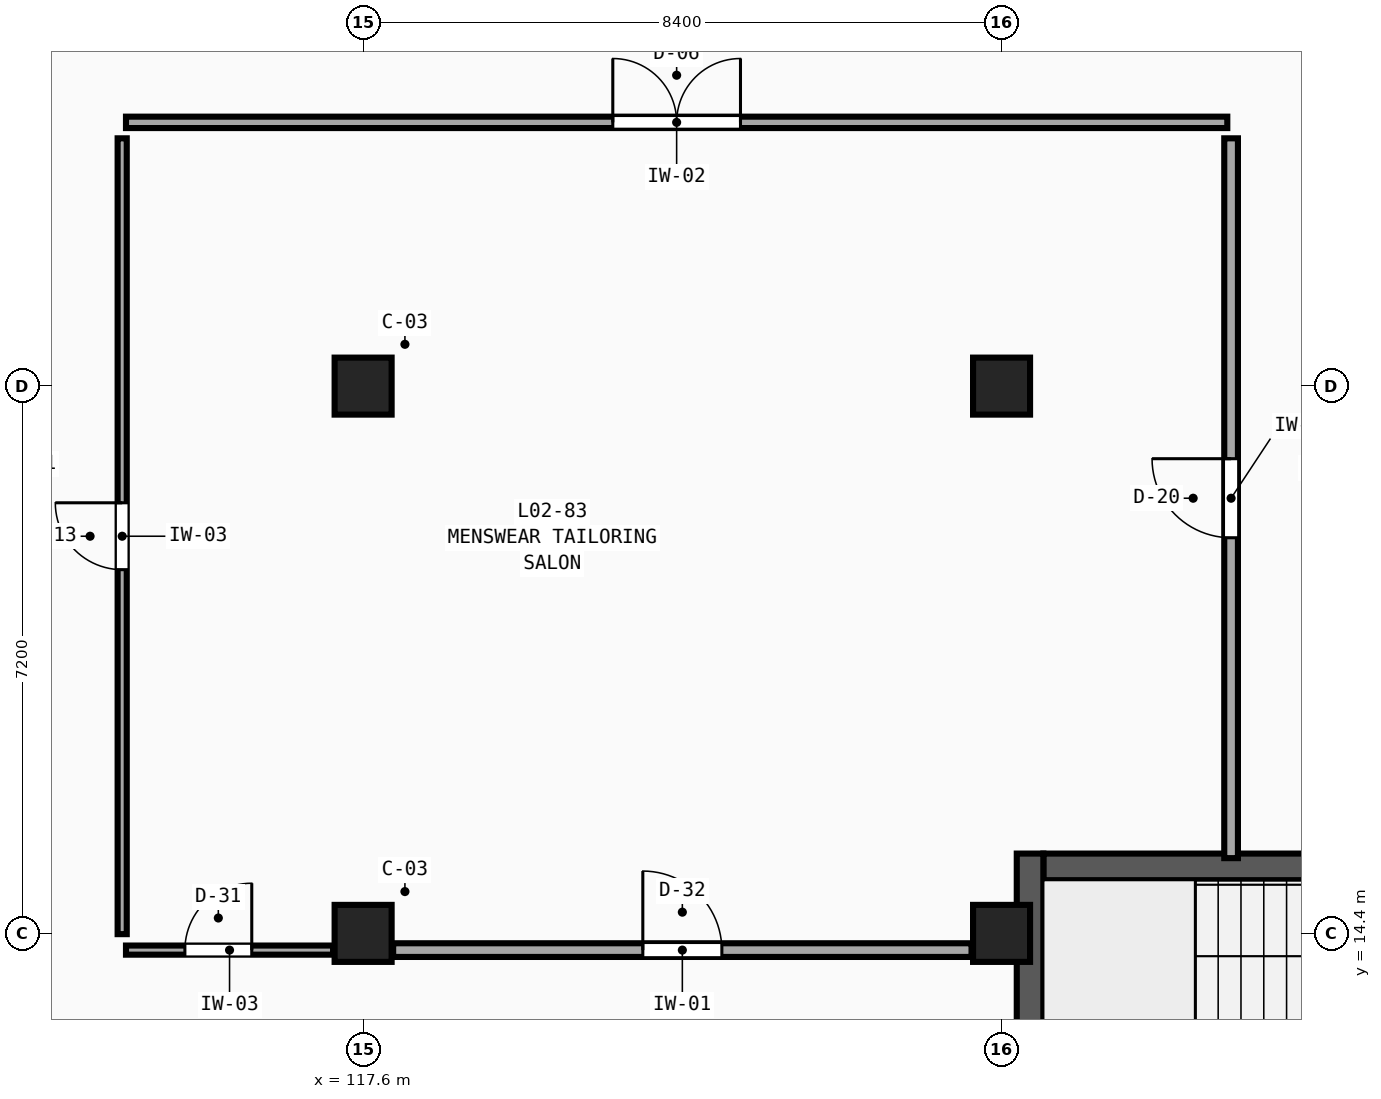
"""IFC4 building model, lengths in metres.
Left out: names, types, materials, properties, quantities, classifications, styles, units other than length and angle.
Written with IfcOpenShell. Run it as: python <this file> out.ifc"""

import sys

from ifc_helpers import new_model, si_unit, direction, frame, frame_2d, origin, origin_2d, place, context, subcontext, project, spatial, rectangle, extrude, element, fill, save


model = new_model("IFC4")
c1 = context("Model", 3, precision=1e-05, world=origin(), true_north=direction((0.0, 1.0)))
c2 = subcontext(c1, "Body", "Model", "MODEL_VIEW")
j1 = project(units=[si_unit("LENGTHUNIT", "METRE"), si_unit("PLANEANGLEUNIT", "RADIAN")], contexts=[c1])
p1 = place(None, origin())
s1 = spatial("IfcSite", under=j1, at=p1, CompositionType="ELEMENT")
p2 = place(p1, origin())
s2 = spatial("IfcBuilding", under=s1, at=p2, CompositionType="ELEMENT")
p3 = place(p2, frame((0.0, 0.0, 9.9)))
s3 = spatial("IfcBuildingStorey", under=s2, at=p3, CompositionType="ELEMENT", Elevation=9.9)
for number, where, z_axis, x_axis in (
    (1, (117.6, 14.4, 0.0), (0.0, 0.0, 1.0), (1.0, 0.0, 0.0)),
    (2, (117.6, 21.6, 0.0), (0.0, 0.0, 1.0), (1.0, 0.0, 0.0)),
    (3, (126.0, 14.4, 0.0), (0.0, 0.0, 1.0), (1.0, 0.0, 0.0)),
    (4, (126.0, 21.6, 0.0), (0.0, 0.0, 1.0), (1.0, 0.0, 0.0)),
):
    element("IfcColumn", number, at=place(p3, frame(where, z_axis=z_axis, x_axis=x_axis)), inside=s3, PredefinedType="COLUMN", context=c2, shape_type="SweptSolid", body=[
        extrude(rectangle(XDim=0.75, YDim=0.75, at=origin_2d()), origin(), (0.0, 0.0, 1.0), 4.5),
    ])
p4 = place(p3, frame((126.55, 15.275, 0.0), z_axis=(0.0, 0.0, 1.0), x_axis=(1.0, 0.0, 0.0)))
e5 = element("IfcWall", 5, at=p4, inside=s3, PredefinedType="SHEAR", context=c2, shape_type="SweptSolid", body=[
    extrude(rectangle(XDim=7.3, YDim=0.35, at=frame_2d((3.65, 0.0))), origin(), (0.0, 0.0, 1.0), 4.5),
])
p5 = place(p3, frame((126.375, 15.45, 0.0), z_axis=(0.0, 0.0, 1.0), x_axis=(0.0, -1.0, 0.0)))
e6 = element("IfcWall", 6, at=p5, inside=s3, PredefinedType="SHEAR", context=c2, shape_type="SweptSolid", body=[
    extrude(rectangle(XDim=8.15, YDim=0.35, at=frame_2d((4.075, 0.0))), origin(), (0.0, 0.0, 1.0), 4.5),
])
p6 = place(p3, frame((114.48, 25.07, 0.0), z_axis=(0.0, 0.0, 1.0), x_axis=(1.0, 0.0, 0.0)))
e7 = element("IfcWall", 7, at=p6, inside=s3, PredefinedType="PARTITIONING", context=c2, shape_type="SweptSolid", body=[
    extrude(rectangle(XDim=14.49, YDim=0.15, at=frame_2d((7.245, 0.0))), origin(), (0.0, 0.0, 1.0), 4.18),
])
p7 = place(p6, frame((6.405, 0.0, 0.0)))
e8 = element("IfcOpeningElement", 8, at=p7, cuts=e7, PredefinedType="OPENING", context=c2, shape_type="SweptSolid", body=[
    extrude(rectangle(XDim=1.68, YDim=2.05, at=frame_2d((0.84, 1.025))), frame((0.0, 0.095, 0.0), z_axis=(0.0, -1.0, 0.0), x_axis=(1.0, 0.0, 0.0)), (0.0, 0.0, 1.0), 0.19),
])
p8 = place(p3, frame((114.48, 14.18, 0.0), z_axis=(0.0, 0.0, 1.0), x_axis=(1.0, 0.0, 0.0)))
e9 = element("IfcWall", 9, at=p8, inside=s3, PredefinedType="PARTITIONING", context=c2, shape_type="SweptSolid", body=[
    extrude(rectangle(XDim=2.725, YDim=0.12, at=frame_2d((1.363, 0.0))), origin(), (0.0, 0.0, 1.0), 3.73),
])
p9 = place(p8, frame((0.775, 0.0, 0.0)))
e10 = element("IfcOpeningElement", 10, at=p9, cuts=e9, PredefinedType="OPENING", context=c2, shape_type="SweptSolid", body=[
    extrude(rectangle(XDim=0.88, YDim=2.45, at=frame_2d((0.44, 1.225))), frame((0.0, 0.08, 0.0), z_axis=(0.0, -1.0, 0.0), x_axis=(1.0, 0.0, 0.0)), (0.0, 0.0, 1.0), 0.16),
])
p10 = place(p3, frame((117.995, 14.18, 0.0), z_axis=(0.0, 0.0, 1.0), x_axis=(1.0, 0.0, 0.0)))
e11 = element("IfcWall", 11, at=p10, inside=s3, PredefinedType="PARTITIONING", context=c2, shape_type="SweptSolid", body=[
    extrude(rectangle(XDim=7.61, YDim=0.18, at=frame_2d((3.805, 0.0))), origin(), (0.0, 0.0, 1.0), 3.73),
])
p11 = place(p10, frame((3.285, 0.0, 0.0)))
e12 = element("IfcOpeningElement", 12, at=p11, cuts=e11, PredefinedType="OPENING", context=c2, shape_type="SweptSolid", body=[
    extrude(rectangle(XDim=1.04, YDim=2.45, at=frame_2d((0.52, 1.225))), frame((0.0, 0.11, 0.0), z_axis=(0.0, -1.0, 0.0), x_axis=(1.0, 0.0, 0.0)), (0.0, 0.0, 1.0), 0.22),
])
p12 = place(p3, frame((114.43, 14.39, 0.0), z_axis=(0.0, 0.0, 1.0), x_axis=(0.0, 1.0, 0.0)))
e13 = element("IfcWall", 13, at=p12, inside=s3, PredefinedType="PARTITIONING", context=c2, shape_type="SweptSolid", body=[
    extrude(rectangle(XDim=10.47, YDim=0.12, at=frame_2d((5.235, 0.0))), origin(), (0.0, 0.0, 1.0), 4.18),
])
p13 = place(p12, frame((4.795, 0.0, 0.0)))
e14 = element("IfcOpeningElement", 14, at=p13, cuts=e13, PredefinedType="OPENING", context=c2, shape_type="SweptSolid", body=[
    extrude(rectangle(XDim=0.88, YDim=2.21, at=frame_2d((0.44, 1.105))), frame((0.0, 0.08, 0.0), z_axis=(0.0, -1.0, 0.0), x_axis=(1.0, 0.0, 0.0)), (0.0, 0.0, 1.0), 0.16),
])
p14 = place(p3, frame((129.02, 15.39, 0.0), z_axis=(0.0, 0.0, 1.0), x_axis=(0.0, 1.0, 0.0)))
e15 = element("IfcWall", 15, at=p14, inside=s3, PredefinedType="PARTITIONING", context=c2, shape_type="SweptSolid", body=[
    extrude(rectangle(XDim=9.47, YDim=0.18, at=frame_2d((4.735, 0.0))), origin(), (0.0, 0.0, 1.0), 4.18),
])
p15 = place(p14, frame((4.215, 0.0, 0.0)))
e16 = element("IfcOpeningElement", 16, at=p15, cuts=e15, PredefinedType="OPENING", context=c2, shape_type="SweptSolid", body=[
    extrude(rectangle(XDim=1.04, YDim=2.29, at=frame_2d((0.52, 1.145))), frame((0.0, 0.11, 0.0), z_axis=(0.0, -1.0, 0.0), x_axis=(1.0, 0.0, 0.0)), (0.0, 0.0, 1.0), 0.22),
])
p16 = place(p7, origin())
e17 = element("IfcDoor", 17, at=p16, inside=s3, OperationType="DOUBLE_DOOR_SINGLE_SWING", PredefinedType="DOOR", context=c2, shape_type="SweptSolid", body=[
    extrude(rectangle(XDim=1.68, YDim=2.05, at=frame_2d((0.84, 1.025))), frame((0.0, 0.025, 0.0), z_axis=(0.0, -1.0, 0.0), x_axis=(1.0, 0.0, 0.0)), (0.0, 0.0, 1.0), 0.05),
])
fill(e8, e17)
p17 = place(p9, origin())
e18 = element("IfcDoor", 18, at=p17, inside=s3, OperationType="SINGLE_SWING_RIGHT", PredefinedType="DOOR", context=c2, shape_type="SweptSolid", body=[
    extrude(rectangle(XDim=0.88, YDim=2.45, at=frame_2d((0.44, 1.225))), frame((0.0, 0.025, 0.0), z_axis=(0.0, -1.0, 0.0), x_axis=(1.0, 0.0, 0.0)), (0.0, 0.0, 1.0), 0.05),
])
fill(e10, e18)
p18 = place(p11, origin())
e19 = element("IfcDoor", 19, at=p18, inside=s3, OperationType="SINGLE_SWING_LEFT", PredefinedType="DOOR", context=c2, shape_type="SweptSolid", body=[
    extrude(rectangle(XDim=1.04, YDim=2.45, at=frame_2d((0.52, 1.225))), frame((0.0, 0.025, 0.0), z_axis=(0.0, -1.0, 0.0), x_axis=(1.0, 0.0, 0.0)), (0.0, 0.0, 1.0), 0.05),
])
fill(e12, e19)
p19 = place(p13, origin())
e20 = element("IfcDoor", 20, at=p19, inside=s3, OperationType="SINGLE_SWING_RIGHT", PredefinedType="DOOR", context=c2, shape_type="SweptSolid", body=[
    extrude(rectangle(XDim=0.88, YDim=2.21, at=frame_2d((0.44, 1.105))), frame((0.0, 0.025, 0.0), z_axis=(0.0, -1.0, 0.0), x_axis=(1.0, 0.0, 0.0)), (0.0, 0.0, 1.0), 0.05),
])
fill(e14, e20)
p20 = place(p15, origin())
e21 = element("IfcDoor", 21, at=p20, inside=s3, OperationType="SINGLE_SWING_RIGHT", PredefinedType="DOOR", context=c2, shape_type="SweptSolid", body=[
    extrude(rectangle(XDim=1.04, YDim=2.29, at=frame_2d((0.52, 1.145))), frame((0.0, 0.025, 0.0), z_axis=(0.0, -1.0, 0.0), x_axis=(1.0, 0.0, 0.0)), (0.0, 0.0, 1.0), 0.05),
])
fill(e16, e21)
save(model, sys.argv[1])
